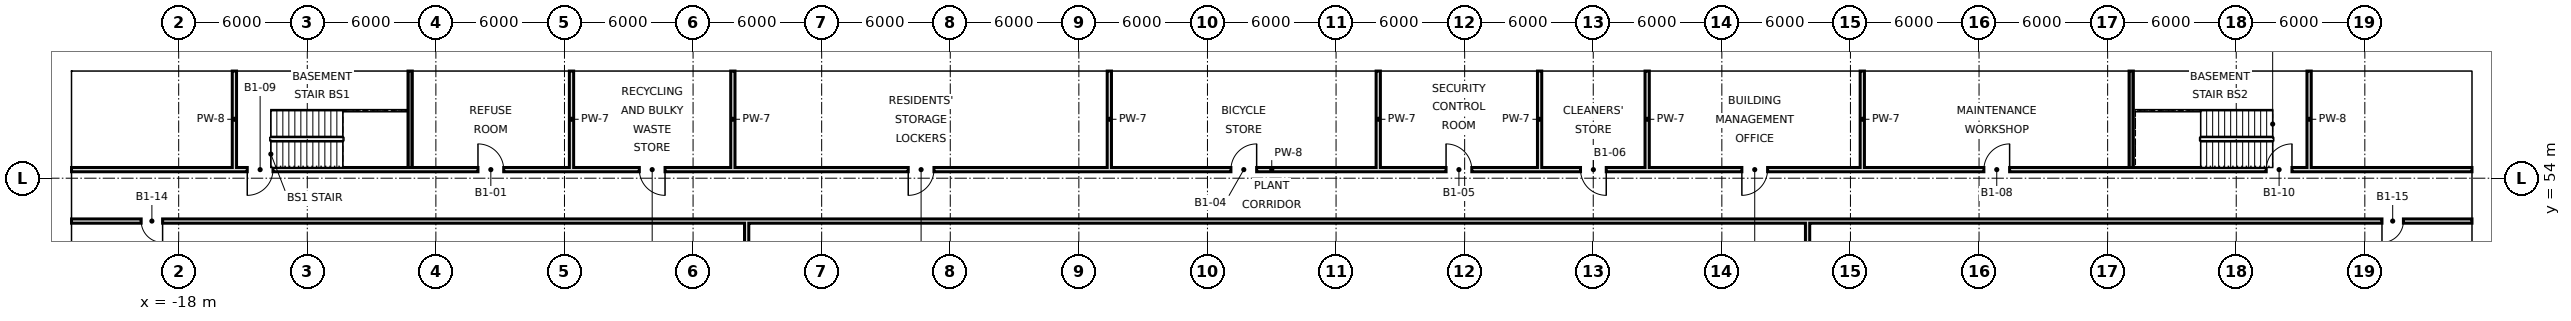
"""IFC4 building model, lengths in metres.
Left out: names, types, materials, properties, quantities, classifications, styles, units other than length and angle.
Written with IfcOpenShell. Run it as: python <this file> out.ifc"""

import sys

from ifc_helpers import new_model, si_unit, direction, frame, frame_2d, origin, place, context, subcontext, project, spatial, rectangle, extrude, element, fill, save


model = new_model("IFC4")
c1 = context("Model", 3, precision=1e-05, world=origin(), true_north=direction((0.0, 1.0)))
c2 = subcontext(c1, "Body", "Model", "MODEL_VIEW")
j1 = project(units=[si_unit("LENGTHUNIT", "METRE"), si_unit("PLANEANGLEUNIT", "RADIAN")], contexts=[c1])
p1 = place(None, origin())
s1 = spatial("IfcSite", under=j1, at=p1, CompositionType="ELEMENT")
p2 = place(p1, origin())
s2 = spatial("IfcBuilding", under=s1, at=p2, CompositionType="ELEMENT")
p3 = place(p2, frame((0.0, 0.0, -13.5)))
s3 = spatial("IfcBuildingStorey", under=s2, at=p3, CompositionType="ELEMENT", Elevation=-13.5)
for number, where, z_axis, x_axis in (
    (1, (-23.5, -12.0, -26.5), (0.0, 0.0, 1.0), (0.0, 1.0, 0.0)),
    (2, (89.5, -12.0, -26.5), (0.0, 0.0, 1.0), (0.0, 1.0, 0.0)),
):
    element("IfcWall", number, at=place(p3, frame(where, z_axis=z_axis, x_axis=x_axis)), inside=s3, PredefinedType="SOLIDWALL", context=c2, shape_type="SweptSolid", body=[
        extrude(rectangle(XDim=72.0, YDim=1.0, at=frame_2d((36.0, 0.0))), origin(), (0.0, 0.0, 1.0), 39.64),
    ])
p4 = place(p3, frame((-23.0, 59.5, -26.5), z_axis=(0.0, 0.0, 1.0), x_axis=(1.0, 0.0, 0.0)))
e3 = element("IfcWall", 3, at=p4, inside=s3, PredefinedType="SOLIDWALL", context=c2, shape_type="SweptSolid", body=[
    extrude(rectangle(XDim=112.0, YDim=1.0, at=frame_2d((56.0, 0.0))), origin(), (0.0, 0.0, 1.0), 39.64),
])
p5 = place(p2, frame((0.0, 0.0, -4.5)))
s4 = spatial("IfcBuildingStorey", under=s2, at=p5, CompositionType="ELEMENT", Elevation=-4.5)
for number, where, z_axis, x_axis in (
    (4, (-15.4, 54.5, 0.0), (0.0, 0.0, 1.0), (0.0, 1.0, 0.0)),
    (5, (-7.2, 54.5, 0.0), (0.0, 0.0, 1.0), (0.0, 1.0, 0.0)),
    (6, (0.328, 54.5, 0.0), (0.0, 0.0, 1.0), (0.0, 1.0, 0.0)),
    (7, (7.856, 54.5, 0.0), (0.0, 0.0, 1.0), (0.0, 1.0, 0.0)),
):
    element("IfcWall", number, at=place(p5, frame(where, z_axis=z_axis, x_axis=x_axis)), inside=s4, PredefinedType="SOLIDWALL", context=c2, shape_type="SweptSolid", body=[
        extrude(rectangle(XDim=4.5, YDim=0.2, at=frame_2d((2.25, 0.0))), origin(), (0.0, 0.0, 1.0), 4.14),
    ])
p6 = place(p5, frame((8.5, 49.6, 0.0), z_axis=(0.0, 0.0, 1.0), x_axis=(0.0, 1.0, 0.0)))
e8 = element("IfcWall", 8, at=p6, inside=s4, PredefinedType="SOLIDWALL", context=c2, shape_type="SweptSolid", body=[
    extrude(rectangle(XDim=2.3, YDim=0.2, at=frame_2d((1.15, 0.0))), origin(), (0.0, 0.0, 1.0), 4.14),
])
for number, where, z_axis, x_axis in (
    (9, (25.422, 54.5, 0.0), (0.0, 0.0, 1.0), (0.0, 1.0, 0.0)),
    (10, (37.969, 54.5, 0.0), (0.0, 0.0, 1.0), (0.0, 1.0, 0.0)),
    (11, (45.497, 54.5, 0.0), (0.0, 0.0, 1.0), (0.0, 1.0, 0.0)),
    (12, (50.516, 54.5, 0.0), (0.0, 0.0, 1.0), (0.0, 1.0, 0.0)),
):
    element("IfcWall", number, at=place(p5, frame(where, z_axis=z_axis, x_axis=x_axis)), inside=s4, PredefinedType="SOLIDWALL", context=c2, shape_type="SweptSolid", body=[
        extrude(rectangle(XDim=4.5, YDim=0.2, at=frame_2d((2.25, 0.0))), origin(), (0.0, 0.0, 1.0), 4.14),
    ])
p7 = place(p5, frame((58.0, -11.0, 0.0), z_axis=(0.0, 0.0, 1.0), x_axis=(0.0, 1.0, 0.0)))
e13 = element("IfcWall", 13, at=p7, inside=s4, PredefinedType="SOLIDWALL", context=c2, shape_type="SweptSolid", body=[
    extrude(rectangle(XDim=62.9, YDim=0.2, at=frame_2d((31.45, 0.0))), origin(), (0.0, 0.0, 1.0), 3.04),
])
p8 = place(p7, frame((0.25, 0.0, 0.0)))
e14 = element("IfcOpeningElement", 14, at=p8, cuts=e13, PredefinedType="OPENING", context=c2, shape_type="SweptSolid", body=[
    extrude(rectangle(XDim=5.3, YDim=2.4, at=frame_2d((2.65, 1.2))), frame((0.0, 0.11, 0.0), z_axis=(0.0, -1.0, 0.0), x_axis=(1.0, 0.0, 0.0)), (0.0, 0.0, 1.0), 0.22),
])
p9 = place(p7, frame((14.25, 0.0, 0.0)))
e15 = element("IfcOpeningElement", 15, at=p9, cuts=e13, PredefinedType="OPENING", context=c2, shape_type="SweptSolid", body=[
    extrude(rectangle(XDim=5.5, YDim=2.4, at=frame_2d((2.75, 1.2))), frame((0.0, 0.11, 0.0), z_axis=(0.0, -1.0, 0.0), x_axis=(1.0, 0.0, 0.0)), (0.0, 0.0, 1.0), 0.22),
])
p10 = place(p7, frame((38.25, 0.0, 0.0)))
e16 = element("IfcOpeningElement", 16, at=p10, cuts=e13, PredefinedType="OPENING", context=c2, shape_type="SweptSolid", body=[
    extrude(rectangle(XDim=5.5, YDim=2.4, at=frame_2d((2.75, 1.2))), frame((0.0, 0.11, 0.0), z_axis=(0.0, -1.0, 0.0), x_axis=(1.0, 0.0, 0.0)), (0.0, 0.0, 1.0), 0.22),
])
p11 = place(p7, frame((50.25, 0.0, 0.0)))
e17 = element("IfcOpeningElement", 17, at=p11, cuts=e13, PredefinedType="OPENING", context=c2, shape_type="SweptSolid", body=[
    extrude(rectangle(XDim=5.5, YDim=2.4, at=frame_2d((2.75, 1.2))), frame((0.0, 0.11, 0.0), z_axis=(0.0, -1.0, 0.0), x_axis=(1.0, 0.0, 0.0)), (0.0, 0.0, 1.0), 0.22),
])
for number, where, z_axis, x_axis in (
    (18, (60.553, 54.5, 0.0), (0.0, 0.0, 1.0), (0.0, 1.0, 0.0)),
    (19, (73.1, 54.5, 0.0), (0.0, 0.0, 1.0), (0.0, 1.0, 0.0)),
    (20, (81.4, 54.5, 0.0), (0.0, 0.0, 1.0), (0.0, 1.0, 0.0)),
):
    element("IfcWall", number, at=place(p5, frame(where, z_axis=z_axis, x_axis=x_axis)), inside=s4, PredefinedType="SOLIDWALL", context=c2, shape_type="SweptSolid", body=[
        extrude(rectangle(XDim=4.5, YDim=0.2, at=frame_2d((2.25, 0.0))), origin(), (0.0, 0.0, 1.0), 4.14),
    ])
p12 = place(p5, frame((-23.0, 52.0, 0.0), z_axis=(0.0, 0.0, 1.0), x_axis=(1.0, 0.0, 0.0)))
e21 = element("IfcWall", 21, at=p12, inside=s4, PredefinedType="SOLIDWALL", context=c2, shape_type="SweptSolid", body=[
    extrude(rectangle(XDim=112.0, YDim=0.2, at=frame_2d((56.0, 0.0))), origin(), (0.0, 0.0, 1.0), 4.14),
])
p13 = place(p12, frame((3.25, 0.0, 0.0)))
e22 = element("IfcOpeningElement", 22, at=p13, cuts=e21, PredefinedType="OPENING", context=c2, shape_type="SweptSolid", body=[
    extrude(rectangle(XDim=1.0, YDim=2.4, at=frame_2d((0.5, 1.2))), frame((0.0, 0.11, 0.0), z_axis=(0.0, -1.0, 0.0), x_axis=(1.0, 0.0, 0.0)), (0.0, 0.0, 1.0), 0.22),
])
p14 = place(p12, frame((107.8, 0.0, 0.0)))
e23 = element("IfcOpeningElement", 23, at=p14, cuts=e21, PredefinedType="OPENING", context=c2, shape_type="SweptSolid", body=[
    extrude(rectangle(XDim=1.0, YDim=2.4, at=frame_2d((0.5, 1.2))), frame((0.0, 0.11, 0.0), z_axis=(0.0, -1.0, 0.0), x_axis=(1.0, 0.0, 0.0)), (0.0, 0.0, 1.0), 0.22),
])
p15 = place(p5, frame((-23.0, 54.4, 0.0), z_axis=(0.0, 0.0, 1.0), x_axis=(1.0, 0.0, 0.0)))
e24 = element("IfcWall", 24, at=p15, inside=s4, PredefinedType="SOLIDWALL", context=c2, shape_type="SweptSolid", body=[
    extrude(rectangle(XDim=112.0, YDim=0.2, at=frame_2d((56.0, 0.0))), origin(), (0.0, 0.0, 1.0), 4.14),
])
p16 = place(p15, frame((18.964, 0.0, 0.0)))
e25 = element("IfcOpeningElement", 25, at=p16, cuts=e24, PredefinedType="OPENING", context=c2, shape_type="SweptSolid", body=[
    extrude(rectangle(XDim=1.2, YDim=2.4, at=frame_2d((0.6, 1.2))), frame((0.0, 0.11, 0.0), z_axis=(0.0, -1.0, 0.0), x_axis=(1.0, 0.0, 0.0)), (0.0, 0.0, 1.0), 0.22),
])
p17 = place(p15, frame((26.492, 0.0, 0.0)))
e26 = element("IfcOpeningElement", 26, at=p17, cuts=e24, PredefinedType="OPENING", context=c2, shape_type="SweptSolid", body=[
    extrude(rectangle(XDim=1.2, YDim=2.4, at=frame_2d((0.6, 1.2))), frame((0.0, 0.11, 0.0), z_axis=(0.0, -1.0, 0.0), x_axis=(1.0, 0.0, 0.0)), (0.0, 0.0, 1.0), 0.22),
])
p18 = place(p15, frame((39.039, 0.0, 0.0)))
e27 = element("IfcOpeningElement", 27, at=p18, cuts=e24, PredefinedType="OPENING", context=c2, shape_type="SweptSolid", body=[
    extrude(rectangle(XDim=1.2, YDim=2.4, at=frame_2d((0.6, 1.2))), frame((0.0, 0.11, 0.0), z_axis=(0.0, -1.0, 0.0), x_axis=(1.0, 0.0, 0.0)), (0.0, 0.0, 1.0), 0.22),
])
p19 = place(p15, frame((54.095, 0.0, 0.0)))
e28 = element("IfcOpeningElement", 28, at=p19, cuts=e24, PredefinedType="OPENING", context=c2, shape_type="SweptSolid", body=[
    extrude(rectangle(XDim=1.2, YDim=2.4, at=frame_2d((0.6, 1.2))), frame((0.0, 0.11, 0.0), z_axis=(0.0, -1.0, 0.0), x_axis=(1.0, 0.0, 0.0)), (0.0, 0.0, 1.0), 0.22),
])
p20 = place(p15, frame((64.133, 0.0, 0.0)))
e29 = element("IfcOpeningElement", 29, at=p20, cuts=e24, PredefinedType="OPENING", context=c2, shape_type="SweptSolid", body=[
    extrude(rectangle(XDim=1.2, YDim=2.4, at=frame_2d((0.6, 1.2))), frame((0.0, 0.11, 0.0), z_axis=(0.0, -1.0, 0.0), x_axis=(1.0, 0.0, 0.0)), (0.0, 0.0, 1.0), 0.22),
])
p21 = place(p15, frame((70.406, 0.0, 0.0)))
e30 = element("IfcOpeningElement", 30, at=p21, cuts=e24, PredefinedType="OPENING", context=c2, shape_type="SweptSolid", body=[
    extrude(rectangle(XDim=1.2, YDim=2.4, at=frame_2d((0.6, 1.2))), frame((0.0, 0.11, 0.0), z_axis=(0.0, -1.0, 0.0), x_axis=(1.0, 0.0, 0.0)), (0.0, 0.0, 1.0), 0.22),
])
p22 = place(p15, frame((77.934, 0.0, 0.0)))
e31 = element("IfcOpeningElement", 31, at=p22, cuts=e24, PredefinedType="OPENING", context=c2, shape_type="SweptSolid", body=[
    extrude(rectangle(XDim=1.2, YDim=2.4, at=frame_2d((0.6, 1.2))), frame((0.0, 0.11, 0.0), z_axis=(0.0, -1.0, 0.0), x_axis=(1.0, 0.0, 0.0)), (0.0, 0.0, 1.0), 0.22),
])
p23 = place(p15, frame((89.227, 0.0, 0.0)))
e32 = element("IfcOpeningElement", 32, at=p23, cuts=e24, PredefinedType="OPENING", context=c2, shape_type="SweptSolid", body=[
    extrude(rectangle(XDim=1.2, YDim=2.4, at=frame_2d((0.6, 1.2))), frame((0.0, 0.11, 0.0), z_axis=(0.0, -1.0, 0.0), x_axis=(1.0, 0.0, 0.0)), (0.0, 0.0, 1.0), 0.22),
])
p24 = place(p15, frame((8.2, 0.0, 0.0)))
e33 = element("IfcOpeningElement", 33, at=p24, cuts=e24, PredefinedType="OPENING", context=c2, shape_type="SweptSolid", body=[
    extrude(rectangle(XDim=1.2, YDim=2.4, at=frame_2d((0.6, 1.2))), frame((0.0, 0.11, 0.0), z_axis=(0.0, -1.0, 0.0), x_axis=(1.0, 0.0, 0.0)), (0.0, 0.0, 1.0), 0.22),
])
p25 = place(p15, frame((102.4, 0.0, 0.0)))
e34 = element("IfcOpeningElement", 34, at=p25, cuts=e24, PredefinedType="OPENING", context=c2, shape_type="SweptSolid", body=[
    extrude(rectangle(XDim=1.2, YDim=2.4, at=frame_2d((0.6, 1.2))), frame((0.0, 0.11, 0.0), z_axis=(0.0, -1.0, 0.0), x_axis=(1.0, 0.0, 0.0)), (0.0, 0.0, 1.0), 0.22),
])
p26 = place(p16, origin())
e35 = element("IfcDoor", 35, at=p26, inside=s4, OperationType="SINGLE_SWING_LEFT", PredefinedType="DOOR", context=c2, shape_type="SweptSolid", body=[
    extrude(rectangle(XDim=1.2, YDim=2.4, at=frame_2d((0.6, 1.2))), frame((0.0, 0.025, 0.0), z_axis=(0.0, -1.0, 0.0), x_axis=(1.0, 0.0, 0.0)), (0.0, 0.0, 1.0), 0.05),
])
fill(e25, e35)
p27 = place(p17, origin())
e36 = element("IfcDoor", 36, at=p27, inside=s4, OperationType="SINGLE_SWING_RIGHT", PredefinedType="DOOR", context=c2, shape_type="SweptSolid", body=[
    extrude(rectangle(XDim=1.2, YDim=2.4, at=frame_2d((0.6, 1.2))), frame((0.0, 0.025, 0.0), z_axis=(0.0, -1.0, 0.0), x_axis=(1.0, 0.0, 0.0)), (0.0, 0.0, 1.0), 0.05),
])
fill(e26, e36)
p28 = place(p18, frame((1.2, 0.0, 0.0), z_axis=(0.0, 0.0, 1.0), x_axis=(-1.0, 0.0, 0.0)))
e37 = element("IfcDoor", 37, at=p28, inside=s4, OperationType="SINGLE_SWING_RIGHT", PredefinedType="DOOR", context=c2, shape_type="SweptSolid", body=[
    extrude(rectangle(XDim=1.2, YDim=2.4, at=frame_2d((0.6, 1.2))), frame((0.0, 0.025, 0.0), z_axis=(0.0, -1.0, 0.0), x_axis=(1.0, 0.0, 0.0)), (0.0, 0.0, 1.0), 0.05),
])
fill(e27, e37)
p29 = place(p19, frame((1.2, 0.0, 0.0), z_axis=(0.0, 0.0, 1.0), x_axis=(-1.0, 0.0, 0.0)))
e38 = element("IfcDoor", 38, at=p29, inside=s4, OperationType="SINGLE_SWING_LEFT", PredefinedType="DOOR", context=c2, shape_type="SweptSolid", body=[
    extrude(rectangle(XDim=1.2, YDim=2.4, at=frame_2d((0.6, 1.2))), frame((0.0, 0.025, 0.0), z_axis=(0.0, -1.0, 0.0), x_axis=(1.0, 0.0, 0.0)), (0.0, 0.0, 1.0), 0.05),
])
fill(e28, e38)
p30 = place(p20, origin())
e39 = element("IfcDoor", 39, at=p30, inside=s4, OperationType="SINGLE_SWING_LEFT", PredefinedType="DOOR", context=c2, shape_type="SweptSolid", body=[
    extrude(rectangle(XDim=1.2, YDim=2.4, at=frame_2d((0.6, 1.2))), frame((0.0, 0.025, 0.0), z_axis=(0.0, -1.0, 0.0), x_axis=(1.0, 0.0, 0.0)), (0.0, 0.0, 1.0), 0.05),
])
fill(e29, e39)
p31 = place(p21, origin())
e40 = element("IfcDoor", 40, at=p31, inside=s4, OperationType="SINGLE_SWING_RIGHT", PredefinedType="DOOR", context=c2, shape_type="SweptSolid", body=[
    extrude(rectangle(XDim=1.2, YDim=2.4, at=frame_2d((0.6, 1.2))), frame((0.0, 0.025, 0.0), z_axis=(0.0, -1.0, 0.0), x_axis=(1.0, 0.0, 0.0)), (0.0, 0.0, 1.0), 0.05),
])
fill(e30, e40)
p32 = place(p22, frame((1.2, 0.0, 0.0), z_axis=(0.0, 0.0, 1.0), x_axis=(-1.0, 0.0, 0.0)))
e41 = element("IfcDoor", 41, at=p32, inside=s4, OperationType="SINGLE_SWING_RIGHT", PredefinedType="DOOR", context=c2, shape_type="SweptSolid", body=[
    extrude(rectangle(XDim=1.2, YDim=2.4, at=frame_2d((0.6, 1.2))), frame((0.0, 0.025, 0.0), z_axis=(0.0, -1.0, 0.0), x_axis=(1.0, 0.0, 0.0)), (0.0, 0.0, 1.0), 0.05),
])
fill(e31, e41)
p33 = place(p23, frame((1.2, 0.0, 0.0), z_axis=(0.0, 0.0, 1.0), x_axis=(-1.0, 0.0, 0.0)))
e42 = element("IfcDoor", 42, at=p33, inside=s4, OperationType="SINGLE_SWING_LEFT", PredefinedType="DOOR", context=c2, shape_type="SweptSolid", body=[
    extrude(rectangle(XDim=1.2, YDim=2.4, at=frame_2d((0.6, 1.2))), frame((0.0, 0.025, 0.0), z_axis=(0.0, -1.0, 0.0), x_axis=(1.0, 0.0, 0.0)), (0.0, 0.0, 1.0), 0.05),
])
fill(e32, e42)
p34 = place(p24, frame((1.2, 0.0, 0.0), z_axis=(0.0, 0.0, 1.0), x_axis=(-1.0, 0.0, 0.0)))
e43 = element("IfcDoor", 43, at=p34, inside=s4, OperationType="SINGLE_SWING_RIGHT", PredefinedType="DOOR", context=c2, shape_type="SweptSolid", body=[
    extrude(rectangle(XDim=1.2, YDim=2.4, at=frame_2d((0.6, 1.2))), frame((0.0, 0.025, 0.0), z_axis=(0.0, -1.0, 0.0), x_axis=(1.0, 0.0, 0.0)), (0.0, 0.0, 1.0), 0.05),
])
fill(e33, e43)
p35 = place(p25, frame((1.2, 0.0, 0.0), z_axis=(0.0, 0.0, 1.0), x_axis=(-1.0, 0.0, 0.0)))
e44 = element("IfcDoor", 44, at=p35, inside=s4, OperationType="SINGLE_SWING_LEFT", PredefinedType="DOOR", context=c2, shape_type="SweptSolid", body=[
    extrude(rectangle(XDim=1.2, YDim=2.4, at=frame_2d((0.6, 1.2))), frame((0.0, 0.025, 0.0), z_axis=(0.0, -1.0, 0.0), x_axis=(1.0, 0.0, 0.0)), (0.0, 0.0, 1.0), 0.05),
])
fill(e34, e44)
p36 = place(p13, origin())
e45 = element("IfcDoor", 45, at=p36, inside=s4, OperationType="SINGLE_SWING_RIGHT", PredefinedType="DOOR", context=c2, shape_type="SweptSolid", body=[
    extrude(rectangle(XDim=1.0, YDim=2.4, at=frame_2d((0.5, 1.2))), frame((0.0, 0.025, 0.0), z_axis=(0.0, -1.0, 0.0), x_axis=(1.0, 0.0, 0.0)), (0.0, 0.0, 1.0), 0.05),
])
fill(e22, e45)
p37 = place(p14, frame((1.0, 0.0, 0.0), z_axis=(0.0, 0.0, 1.0), x_axis=(-1.0, 0.0, 0.0)))
e46 = element("IfcDoor", 46, at=p37, inside=s4, OperationType="SINGLE_SWING_RIGHT", PredefinedType="DOOR", context=c2, shape_type="SweptSolid", body=[
    extrude(rectangle(XDim=1.0, YDim=2.4, at=frame_2d((0.5, 1.2))), frame((0.0, 0.025, 0.0), z_axis=(0.0, -1.0, 0.0), x_axis=(1.0, 0.0, 0.0)), (0.0, 0.0, 1.0), 0.05),
])
fill(e23, e46)
save(model, sys.argv[1])
